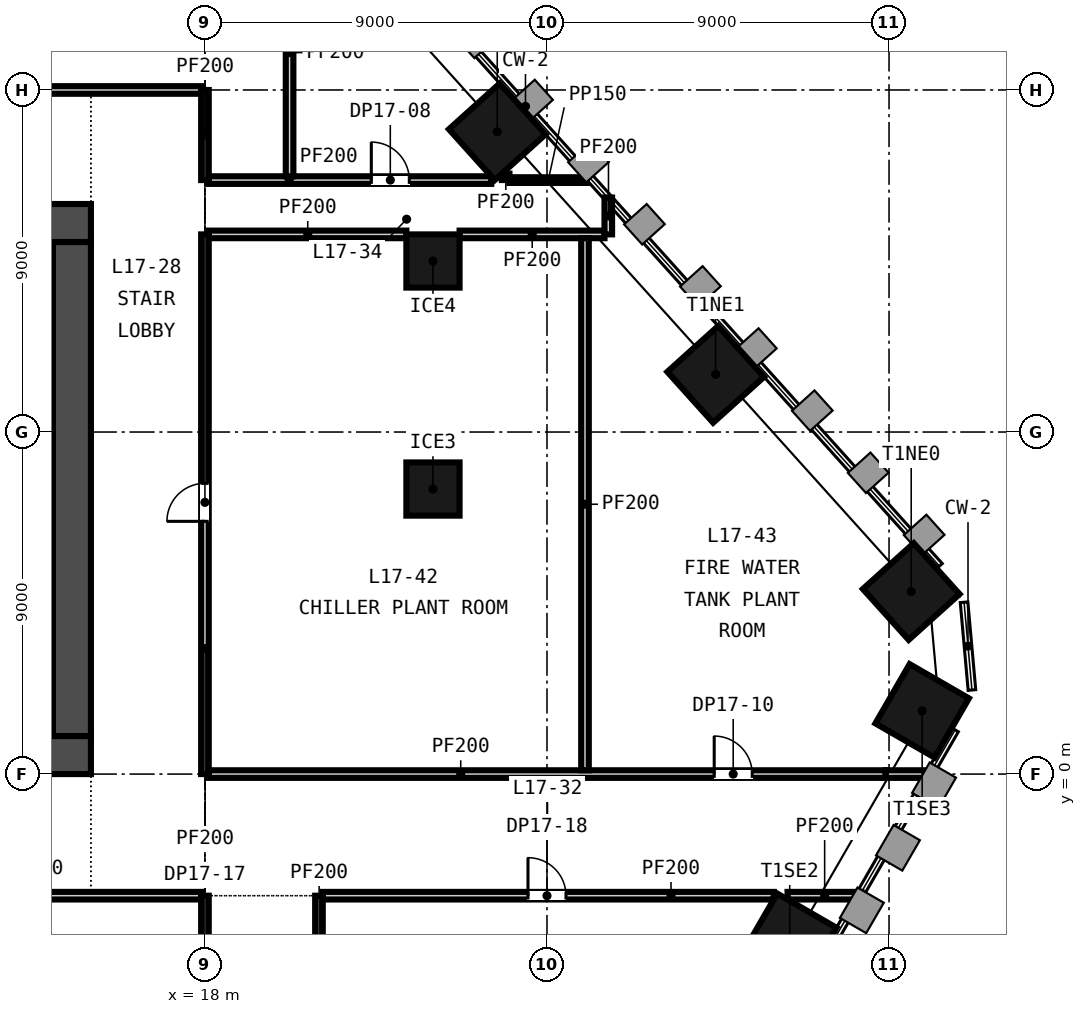
"""IFC4 building model, lengths in metres.
Left out: names, types, materials, properties, quantities, classifications, styles, units other than length and angle.
Written with IfcOpenShell. Run it as: python <this file> out.ifc"""

import sys

from ifc_helpers import new_model, si_unit, direction, frame, frame_2d, origin, origin_2d, place, context, subcontext, project, spatial, rectangle, extrude, element, fill, save


model = new_model("IFC4")
c1 = context("Model", 3, precision=1e-05, world=origin(), true_north=direction((0.0, 1.0)))
c2 = subcontext(c1, "Body", "Model", "MODEL_VIEW")
j1 = project(units=[si_unit("LENGTHUNIT", "METRE"), si_unit("PLANEANGLEUNIT", "RADIAN")], contexts=[c1])
p1 = place(None, origin())
s1 = spatial("IfcSite", under=j1, at=p1, CompositionType="ELEMENT")
p2 = place(p1, origin())
s2 = spatial("IfcBuilding", under=s1, at=p2, CompositionType="ELEMENT")
p3 = place(p2, frame((0.0, 0.0, 76.15)))
s3 = spatial("IfcBuildingStorey", under=s2, at=p3, CompositionType="ELEMENT", Elevation=76.15)
p4 = place(p3, frame((-15.0, 0.5, -0.3), z_axis=(0.0, 0.0, 1.0), x_axis=(1.0, 0.0, 0.0)))
e1 = element("IfcWall", 1, at=p4, inside=s3, PredefinedType="SOLIDWALL", context=c2, shape_type="SweptSolid", body=[
    extrude(rectangle(XDim=30.0, YDim=1.0, at=frame_2d((15.0, 0.0))), origin(), (0.0, 0.0, 1.0), 4.65),
])
p5 = place(p4, frame((5.8, 0.0, 0.3)))
e2 = element("IfcOpeningElement", 2, at=p5, cuts=e1, PredefinedType="OPENING", context=c2, shape_type="SweptSolid", body=[
    extrude(rectangle(XDim=2.4, YDim=2.4, at=frame_2d((1.2, 1.2))), frame((0.0, 0.51, 0.0), z_axis=(0.0, -1.0, 0.0), x_axis=(1.0, 0.0, 0.0)), (0.0, 0.0, 1.0), 1.02),
])
p6 = place(p4, frame((13.8, 0.0, 0.3)))
e3 = element("IfcOpeningElement", 3, at=p6, cuts=e1, PredefinedType="OPENING", context=c2, shape_type="SweptSolid", body=[
    extrude(rectangle(XDim=2.4, YDim=2.4, at=frame_2d((1.2, 1.2))), frame((0.0, 0.51, 0.0), z_axis=(0.0, -1.0, 0.0), x_axis=(1.0, 0.0, 0.0)), (0.0, 0.0, 1.0), 1.02),
])
p7 = place(p4, frame((21.8, 0.0, 0.3)))
e4 = element("IfcOpeningElement", 4, at=p7, cuts=e1, PredefinedType="OPENING", context=c2, shape_type="SweptSolid", body=[
    extrude(rectangle(XDim=2.4, YDim=2.4, at=frame_2d((1.2, 1.2))), frame((0.0, 0.51, 0.0), z_axis=(0.0, -1.0, 0.0), x_axis=(1.0, 0.0, 0.0)), (0.0, 0.0, 1.0), 1.02),
])
p8 = place(p4, frame((1.5, 0.0, 0.3)))
e5 = element("IfcOpeningElement", 5, at=p8, cuts=e1, PredefinedType="OPENING", context=c2, shape_type="SweptSolid", body=[
    extrude(rectangle(XDim=1.2, YDim=2.1, at=frame_2d((0.6, 1.05))), frame((0.0, 0.51, 0.0), z_axis=(0.0, -1.0, 0.0), x_axis=(1.0, 0.0, 0.0)), (0.0, 0.0, 1.0), 1.02),
])
p9 = place(p4, frame((27.3, 0.0, 0.3)))
e6 = element("IfcOpeningElement", 6, at=p9, cuts=e1, PredefinedType="OPENING", context=c2, shape_type="SweptSolid", body=[
    extrude(rectangle(XDim=1.2, YDim=2.1, at=frame_2d((0.6, 1.05))), frame((0.0, 0.51, 0.0), z_axis=(0.0, -1.0, 0.0), x_axis=(1.0, 0.0, 0.0)), (0.0, 0.0, 1.0), 1.02),
])
p10 = place(p3, frame((-15.0, 14.5, -0.3), z_axis=(0.0, 0.0, 1.0), x_axis=(1.0, 0.0, 0.0)))
e7 = element("IfcWall", 7, at=p10, inside=s3, PredefinedType="SOLIDWALL", context=c2, shape_type="SweptSolid", body=[
    extrude(rectangle(XDim=30.0, YDim=1.0, at=frame_2d((15.0, 0.0))), origin(), (0.0, 0.0, 1.0), 4.65),
])
p11 = place(p10, frame((9.25, 0.0, 0.3)))
e8 = element("IfcOpeningElement", 8, at=p11, cuts=e7, PredefinedType="OPENING", context=c2, shape_type="SweptSolid", body=[
    extrude(rectangle(XDim=1.5, YDim=2.1, at=frame_2d((0.75, 1.05))), frame((0.0, 0.51, 0.0), z_axis=(0.0, -1.0, 0.0), x_axis=(1.0, 0.0, 0.0)), (0.0, 0.0, 1.0), 1.02),
])
p12 = place(p10, frame((19.4, 0.0, 0.3)))
e9 = element("IfcOpeningElement", 9, at=p12, cuts=e7, PredefinedType="OPENING", context=c2, shape_type="SweptSolid", body=[
    extrude(rectangle(XDim=1.5, YDim=2.1, at=frame_2d((0.75, 1.05))), frame((0.0, 0.51, 0.0), z_axis=(0.0, -1.0, 0.0), x_axis=(1.0, 0.0, 0.0)), (0.0, 0.0, 1.0), 1.02),
])
p13 = place(p10, frame((1.5, 0.0, 0.3)))
e10 = element("IfcOpeningElement", 10, at=p13, cuts=e7, PredefinedType="OPENING", context=c2, shape_type="SweptSolid", body=[
    extrude(rectangle(XDim=1.2, YDim=2.1, at=frame_2d((0.6, 1.05))), frame((0.0, 0.51, 0.0), z_axis=(0.0, -1.0, 0.0), x_axis=(1.0, 0.0, 0.0)), (0.0, 0.0, 1.0), 1.02),
])
p14 = place(p10, frame((27.3, 0.0, 0.3)))
e11 = element("IfcOpeningElement", 11, at=p14, cuts=e7, PredefinedType="OPENING", context=c2, shape_type="SweptSolid", body=[
    extrude(rectangle(XDim=1.2, YDim=2.1, at=frame_2d((0.6, 1.05))), frame((0.0, 0.51, 0.0), z_axis=(0.0, -1.0, 0.0), x_axis=(1.0, 0.0, 0.0)), (0.0, 0.0, 1.0), 1.02),
])
p15 = place(p3, frame((14.5, 1.0, -0.3), z_axis=(0.0, 0.0, 1.0), x_axis=(0.0, 1.0, 0.0)))
e12 = element("IfcWall", 12, at=p15, inside=s3, PredefinedType="SOLIDWALL", context=c2, shape_type="SweptSolid", body=[
    extrude(rectangle(XDim=13.0, YDim=1.0, at=frame_2d((6.5, 0.0))), origin(), (0.0, 0.0, 1.0), 4.65),
])
for number, where, z_axis, x_axis in (
    (13, (33.387, -4.373, -0.3), (0.0, 0.0, 1.0), (0.5, 0.866, 0.0)),
    (14, (36.872, 1.663, -0.3), (0.0, 0.0, 1.0), (0.5, 0.866, 0.0)),
    (15, (36.584, 4.803, -0.3), (0.0, 0.0, 1.0), (-0.669, 0.743, 0.0)),
    (16, (31.438, 10.517, -0.3), (0.0, 0.0, 1.0), (-0.669, 0.743, 0.0)),
    (17, (25.691, 16.9, -0.3), (0.0, 0.0, 1.0), (-0.669, 0.743, 0.0)),
):
    element("IfcColumn", number, at=place(p3, frame(where, z_axis=z_axis, x_axis=x_axis)), inside=s3, PredefinedType="COLUMN", context=c2, shape_type="SweptSolid", body=[
        extrude(rectangle(XDim=1.8, YDim=1.8, at=origin_2d()), origin(), (0.0, 0.0, 1.0), 4.65),
    ])
for number, where, z_axis, x_axis in (
    (18, (24.0, 7.5, -0.3), (0.0, 0.0, 1.0), (1.0, 0.0, 0.0)),
    (19, (24.0, 13.5, -0.3), (0.0, 0.0, 1.0), (1.0, 0.0, 0.0)),
):
    element("IfcColumn", number, at=place(p3, frame(where, z_axis=z_axis, x_axis=x_axis)), inside=s3, PredefinedType="COLUMN", context=c2, shape_type="SweptSolid", body=[
        extrude(rectangle(XDim=1.4, YDim=1.4, at=origin_2d()), origin(), (0.0, 0.0, 1.0), 4.65),
    ])
p16 = place(p3, frame((11.05, 7.35, -0.3), z_axis=(0.0, 0.0, 1.0), x_axis=(1.0, 0.0, 0.0)))
e20 = element("IfcWall", 20, at=p16, inside=s3, PredefinedType="SOLIDWALL", context=c2, shape_type="SweptSolid", body=[
    extrude(rectangle(XDim=2.95, YDim=0.3, at=frame_2d((1.475, 0.0))), origin(), (0.0, 0.0, 1.0), 4.65),
])
p17 = place(p3, frame((9.1, -3.2, 0.0), z_axis=(0.0, 0.0, 1.0), x_axis=(1.0, 0.0, 0.0)))
e21 = element("IfcWall", 21, at=p17, inside=s3, PredefinedType="PARTITIONING", context=c2, shape_type="SweptSolid", body=[
    extrude(rectangle(XDim=8.8, YDim=0.2, at=frame_2d((4.4, 0.0))), origin(), (0.0, 0.0, 1.0), 4.35),
])
p18 = place(p3, frame((21.1, -3.2, 0.0), z_axis=(0.0, 0.0, 1.0), x_axis=(1.0, 0.0, 0.0)))
e22 = element("IfcWall", 22, at=p18, inside=s3, PredefinedType="PARTITIONING", context=c2, shape_type="SweptSolid", body=[
    extrude(rectangle(XDim=11.867, YDim=0.2, at=frame_2d((5.933, 0.0))), origin(), (0.0, 0.0, 1.0), 4.35),
])
p19 = place(p18, frame((5.4, 0.0, 0.0)))
e23 = element("IfcOpeningElement", 23, at=p19, cuts=e22, PredefinedType="OPENING", context=c2, shape_type="SweptSolid", body=[
    extrude(rectangle(XDim=1.0, YDim=2.1, at=frame_2d((0.5, 1.05))), frame((0.0, 0.11, 0.0), z_axis=(0.0, -1.0, 0.0), x_axis=(1.0, 0.0, 0.0)), (0.0, 0.0, 1.0), 0.22),
])
p20 = place(p3, frame((33.329, -3.2, 0.0), z_axis=(0.0, 0.0, 1.0), x_axis=(1.0, 0.0, 0.0)))
e24 = element("IfcWall", 24, at=p20, inside=s3, PredefinedType="PARTITIONING", context=c2, shape_type="SweptSolid", body=[
    extrude(rectangle(XDim=1.944, YDim=0.2, at=frame_2d((0.972, 0.0))), origin(), (0.0, 0.0, 1.0), 3.5),
])
p21 = place(p3, frame((18.1, 0.0, 0.0), z_axis=(0.0, 0.0, 1.0), x_axis=(1.0, 0.0, 0.0)))
e25 = element("IfcWall", 25, at=p21, inside=s3, PredefinedType="PARTITIONING", context=c2, shape_type="SweptSolid", body=[
    extrude(rectangle(XDim=17.811, YDim=0.2, at=frame_2d((8.906, 0.0))), origin(), (0.0, 0.0, 1.0), 4.35),
])
p22 = place(p21, frame((13.3, 0.0, 0.0)))
e26 = element("IfcOpeningElement", 26, at=p22, cuts=e25, PredefinedType="OPENING", context=c2, shape_type="SweptSolid", body=[
    extrude(rectangle(XDim=1.0, YDim=2.1, at=frame_2d((0.5, 1.05))), frame((0.0, 0.11, 0.0), z_axis=(0.0, -1.0, 0.0), x_axis=(1.0, 0.0, 0.0)), (0.0, 0.0, 1.0), 0.22),
])
p23 = place(p3, frame((35.911, 0.0, 0.0), z_axis=(0.0, 0.0, 1.0), x_axis=(1.0, 0.0, 0.0)))
e27 = element("IfcWall", 27, at=p23, inside=s3, PredefinedType="PARTITIONING", context=c2, shape_type="SweptSolid", body=[
    extrude(rectangle(XDim=1.209, YDim=0.2, at=frame_2d((0.604, 0.0))), origin(), (0.0, 0.0, 1.0), 3.5),
])
p24 = place(p3, frame((18.1, 14.2, 0.0), z_axis=(0.0, 0.0, 1.0), x_axis=(1.0, 0.0, 0.0)))
e28 = element("IfcWall", 28, at=p24, inside=s3, PredefinedType="PARTITIONING", context=c2, shape_type="SweptSolid", body=[
    extrude(rectangle(XDim=5.2, YDim=0.2, at=frame_2d((2.6, 0.0))), origin(), (0.0, 0.0, 1.0), 3.75),
])
p25 = place(p3, frame((24.7, 14.2, 0.0), z_axis=(0.0, 0.0, 1.0), x_axis=(1.0, 0.0, 0.0)))
e29 = element("IfcWall", 29, at=p25, inside=s3, PredefinedType="PARTITIONING", context=c2, shape_type="SweptSolid", body=[
    extrude(rectangle(XDim=3.813, YDim=0.2, at=frame_2d((1.906, 0.0))), origin(), (0.0, 0.0, 1.0), 4.35),
])
p26 = place(p3, frame((18.1, 15.629, 0.0), z_axis=(0.0, 0.0, 1.0), x_axis=(1.0, 0.0, 0.0)))
e30 = element("IfcWall", 30, at=p26, inside=s3, PredefinedType="PARTITIONING", context=c2, shape_type="SweptSolid", body=[
    extrude(rectangle(XDim=7.435, YDim=0.2, at=frame_2d((3.717, 0.0))), origin(), (0.0, 0.0, 1.0), 4.35),
])
p27 = place(p26, frame((4.277, 0.0, 0.0)))
e31 = element("IfcOpeningElement", 31, at=p27, cuts=e30, PredefinedType="OPENING", context=c2, shape_type="SweptSolid", body=[
    extrude(rectangle(XDim=1.0, YDim=2.1, at=frame_2d((0.5, 1.05))), frame((0.0, 0.11, 0.0), z_axis=(0.0, -1.0, 0.0), x_axis=(1.0, 0.0, 0.0)), (0.0, 0.0, 1.0), 0.22),
])
p28 = place(p3, frame((26.012, 15.629, 0.0), z_axis=(0.0, 0.0, 1.0), x_axis=(1.0, 0.0, 0.0)))
e32 = element("IfcWall", 32, at=p28, inside=s3, PredefinedType="PARTITIONING", context=c2, shape_type="SweptSolid", body=[
    extrude(rectangle(XDim=2.035, YDim=0.15, at=frame_2d((1.018, 0.0))), origin(), (0.0, 0.0, 1.0), 3.5),
])
p29 = place(p3, frame((-26.117, 18.0, 0.0), z_axis=(0.0, 0.0, 1.0), x_axis=(1.0, 0.0, 0.0)))
e33 = element("IfcWall", 33, at=p29, inside=s3, PredefinedType="PARTITIONING", context=c2, shape_type="SweptSolid", body=[
    extrude(rectangle(XDim=44.017, YDim=0.2, at=frame_2d((22.008, 0.0))), origin(), (0.0, 0.0, 1.0), 4.35),
])
p30 = place(p29, frame((2.65, 0.0, 0.0)))
e34 = element("IfcOpeningElement", 34, at=p30, cuts=e33, PredefinedType="OPENING", context=c2, shape_type="SweptSolid", body=[
    extrude(rectangle(XDim=1.0, YDim=2.1, at=frame_2d((0.5, 1.05))), frame((0.0, 0.11, 0.0), z_axis=(0.0, -1.0, 0.0), x_axis=(1.0, 0.0, 0.0)), (0.0, 0.0, 1.0), 0.22),
])
p31 = place(p29, frame((14.267, 0.0, 0.0)))
e35 = element("IfcOpeningElement", 35, at=p31, cuts=e33, PredefinedType="OPENING", context=c2, shape_type="SweptSolid", body=[
    extrude(rectangle(XDim=1.0, YDim=2.1, at=frame_2d((0.5, 1.05))), frame((0.0, 0.11, 0.0), z_axis=(0.0, -1.0, 0.0), x_axis=(1.0, 0.0, 0.0)), (0.0, 0.0, 1.0), 0.22),
])
p32 = place(p29, frame((21.871, 0.0, 0.0)))
e36 = element("IfcOpeningElement", 36, at=p32, cuts=e33, PredefinedType="OPENING", context=c2, shape_type="SweptSolid", body=[
    extrude(rectangle(XDim=1.0, YDim=2.1, at=frame_2d((0.5, 1.05))), frame((0.0, 0.11, 0.0), z_axis=(0.0, -1.0, 0.0), x_axis=(1.0, 0.0, 0.0)), (0.0, 0.0, 1.0), 0.22),
])
p33 = place(p29, frame((29.871, 0.0, 0.0)))
e37 = element("IfcOpeningElement", 37, at=p33, cuts=e33, PredefinedType="OPENING", context=c2, shape_type="SweptSolid", body=[
    extrude(rectangle(XDim=1.0, YDim=2.1, at=frame_2d((0.5, 1.05))), frame((0.0, 0.11, 0.0), z_axis=(0.0, -1.0, 0.0), x_axis=(1.0, 0.0, 0.0)), (0.0, 0.0, 1.0), 0.22),
])
p34 = place(p29, frame((37.244, 0.0, 0.0)))
e38 = element("IfcOpeningElement", 38, at=p34, cuts=e33, PredefinedType="OPENING", context=c2, shape_type="SweptSolid", body=[
    extrude(rectangle(XDim=1.0, YDim=2.1, at=frame_2d((0.5, 1.05))), frame((0.0, 0.11, 0.0), z_axis=(0.0, -1.0, 0.0), x_axis=(1.0, 0.0, 0.0)), (0.0, 0.0, 1.0), 0.22),
])
p35 = place(p3, frame((18.0, -15.6, 0.0), z_axis=(0.0, 0.0, 1.0), x_axis=(0.0, 1.0, 0.0)))
e39 = element("IfcWall", 39, at=p35, inside=s3, PredefinedType="PARTITIONING", context=c2, shape_type="SweptSolid", body=[
    extrude(rectangle(XDim=12.4, YDim=0.2, at=frame_2d((6.2, 0.0))), origin(), (0.0, 0.0, 1.0), 4.35),
])
p36 = place(p35, frame((5.65, 0.0, 0.0)))
e40 = element("IfcOpeningElement", 40, at=p36, cuts=e39, PredefinedType="OPENING", context=c2, shape_type="SweptSolid", body=[
    extrude(rectangle(XDim=1.0, YDim=2.1, at=frame_2d((0.5, 1.05))), frame((0.0, 0.11, 0.0), z_axis=(0.0, -1.0, 0.0), x_axis=(1.0, 0.0, 0.0)), (0.0, 0.0, 1.0), 0.22),
])
p37 = place(p3, frame((18.0, 0.0, 0.0), z_axis=(0.0, 0.0, 1.0), x_axis=(0.0, 1.0, 0.0)))
e41 = element("IfcWall", 41, at=p37, inside=s3, PredefinedType="PARTITIONING", context=c2, shape_type="SweptSolid", body=[
    extrude(rectangle(XDim=14.2, YDim=0.2, at=frame_2d((7.1, 0.0))), origin(), (0.0, 0.0, 1.0), 4.35),
])
p38 = place(p37, frame((6.65, 0.0, 0.0)))
e42 = element("IfcOpeningElement", 42, at=p38, cuts=e41, PredefinedType="OPENING", context=c2, shape_type="SweptSolid", body=[
    extrude(rectangle(XDim=1.0, YDim=2.1, at=frame_2d((0.5, 1.05))), frame((0.0, 0.11, 0.0), z_axis=(0.0, -1.0, 0.0), x_axis=(1.0, 0.0, 0.0)), (0.0, 0.0, 1.0), 0.22),
])
p39 = place(p3, frame((18.0, 15.629, 0.0), z_axis=(0.0, 0.0, 1.0), x_axis=(0.0, 1.0, 0.0)))
e43 = element("IfcWall", 43, at=p39, inside=s3, PredefinedType="PARTITIONING", context=c2, shape_type="SweptSolid", body=[
    extrude(rectangle(XDim=2.371, YDim=0.2, at=frame_2d((1.185, 0.0))), origin(), (0.0, 0.0, 1.0), 4.35),
])
p40 = place(p3, frame((20.227, 15.729, 0.0), z_axis=(0.0, 0.0, 1.0), x_axis=(0.0, 1.0, 0.0)))
e44 = element("IfcWall", 44, at=p40, inside=s3, PredefinedType="PARTITIONING", context=c2, shape_type="SweptSolid", body=[
    extrude(rectangle(XDim=6.509, YDim=0.2, at=frame_2d((3.254, 0.0))), origin(), (0.0, 0.0, 1.0), 4.35),
])
p41 = place(p3, frame((21.0, -15.6, 0.0), z_axis=(0.0, 0.0, 1.0), x_axis=(0.0, 1.0, 0.0)))
e45 = element("IfcWall", 45, at=p41, inside=s3, PredefinedType="PARTITIONING", context=c2, shape_type="SweptSolid", body=[
    extrude(rectangle(XDim=12.4, YDim=0.2, at=frame_2d((6.2, 0.0))), origin(), (0.0, 0.0, 1.0), 4.35),
])
p42 = place(p3, frame((25.912, 15.63, 0.0), z_axis=(0.0, 0.0, 1.0), x_axis=(0.0, 1.0, 0.0)))
e46 = element("IfcWall", 46, at=p42, inside=s3, PredefinedType="PARTITIONING", context=c2, shape_type="SweptSolid", body=[
    extrude(rectangle(XDim=0.168, YDim=0.2, at=frame_2d((0.084, 0.0))), origin(), (0.0, 0.0, 1.0), 4.35),
])
p43 = place(p3, frame((28.0, 0.1, 0.0), z_axis=(0.0, 0.0, 1.0), x_axis=(0.0, 1.0, 0.0)))
e47 = element("IfcWall", 47, at=p43, inside=s3, PredefinedType="PARTITIONING", context=c2, shape_type="SweptSolid", body=[
    extrude(rectangle(XDim=14.0, YDim=0.2, at=frame_2d((7.0, 0.0))), origin(), (0.0, 0.0, 1.0), 4.35),
])
p44 = place(p3, frame((28.613, 14.2, 0.0), z_axis=(0.0, 0.0, 1.0), x_axis=(0.0, 1.0, 0.0)))
e48 = element("IfcWall", 48, at=p44, inside=s3, PredefinedType="PARTITIONING", context=c2, shape_type="SweptSolid", body=[
    extrude(rectangle(XDim=0.97, YDim=0.2, at=frame_2d((0.485, 0.0))), origin(), (0.0, 0.0, 1.0), 3.5),
])
p45 = place(p27, origin())
e49 = element("IfcDoor", 49, at=p45, inside=s3, OperationType="SINGLE_SWING_LEFT", PredefinedType="DOOR", context=c2, shape_type="SweptSolid", body=[
    extrude(rectangle(XDim=1.0, YDim=2.1, at=frame_2d((0.5, 1.05))), frame((0.0, 0.025, 0.0), z_axis=(0.0, -1.0, 0.0), x_axis=(1.0, 0.0, 0.0)), (0.0, 0.0, 1.0), 0.05),
])
fill(e31, e49)
p46 = place(p38, origin())
e50 = element("IfcDoor", 50, at=p46, inside=s3, OperationType="SINGLE_SWING_LEFT", PredefinedType="DOOR", context=c2, shape_type="SweptSolid", body=[
    extrude(rectangle(XDim=1.0, YDim=2.1, at=frame_2d((0.5, 1.05))), frame((0.0, 0.025, 0.0), z_axis=(0.0, -1.0, 0.0), x_axis=(1.0, 0.0, 0.0)), (0.0, 0.0, 1.0), 0.05),
])
fill(e42, e50)
p47 = place(p22, origin())
e51 = element("IfcDoor", 51, at=p47, inside=s3, OperationType="SINGLE_SWING_LEFT", PredefinedType="DOOR", context=c2, shape_type="SweptSolid", body=[
    extrude(rectangle(XDim=1.0, YDim=2.1, at=frame_2d((0.5, 1.05))), frame((0.0, 0.025, 0.0), z_axis=(0.0, -1.0, 0.0), x_axis=(1.0, 0.0, 0.0)), (0.0, 0.0, 1.0), 0.05),
])
fill(e26, e51)
p48 = place(p19, origin())
e52 = element("IfcDoor", 52, at=p48, inside=s3, OperationType="SINGLE_SWING_LEFT", PredefinedType="DOOR", context=c2, shape_type="SweptSolid", body=[
    extrude(rectangle(XDim=1.0, YDim=2.1, at=frame_2d((0.5, 1.05))), frame((0.0, 0.025, 0.0), z_axis=(0.0, -1.0, 0.0), x_axis=(1.0, 0.0, 0.0)), (0.0, 0.0, 1.0), 0.05),
])
fill(e23, e52)
save(model, sys.argv[1])
